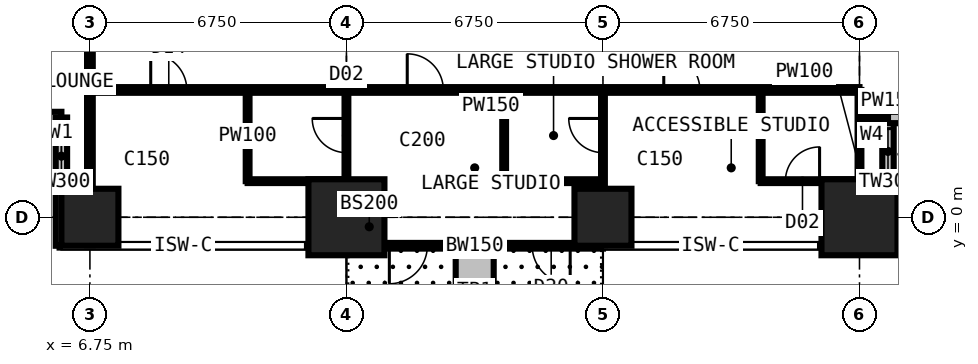
"""IFC4 building model, lengths in metres.
Left out: names, types, materials, properties, quantities, classifications, styles, units other than length and angle.
Written with IfcOpenShell. Run it as: python <this file> out.ifc"""

import sys

from ifc_helpers import new_model, si_unit, direction, frame, frame_2d, origin, origin_2d, place, context, subcontext, project, spatial, rectangle, extrude, element, fill, save


model = new_model("IFC4")
c1 = context("Model", 3, precision=1e-05, world=origin(), true_north=direction((0.0, 1.0)))
c2 = subcontext(c1, "Body", "Model", "MODEL_VIEW")
j1 = project(units=[si_unit("LENGTHUNIT", "METRE"), si_unit("PLANEANGLEUNIT", "RADIAN")], contexts=[c1])
p1 = place(None, origin())
s1 = spatial("IfcSite", under=j1, at=p1, CompositionType="ELEMENT")
p2 = place(p1, origin())
s2 = spatial("IfcBuilding", under=s1, at=p2, CompositionType="ELEMENT")
p3 = place(p2, frame((0.0, 0.0, 142.2)))
s3 = spatial("IfcBuildingStorey", under=s2, at=p3, CompositionType="ELEMENT", Elevation=142.2)
p4 = place(p3, frame((6.75, 0.0, 0.0), z_axis=(0.0, 0.0, 1.0), x_axis=(1.0, 0.0, 0.0)))
e1 = element("IfcColumn", 1, at=p4, inside=s3, PredefinedType="COLUMN", context=c2, shape_type="SweptSolid", body=[
    extrude(rectangle(XDim=1.5, YDim=1.5, at=origin_2d()), origin(), (0.0, 0.0, 1.0), 3.6),
])
p5 = place(p3, frame((13.5, 0.0, 0.0), z_axis=(0.0, 0.0, 1.0), x_axis=(1.0, 0.0, 0.0)))
e2 = element("IfcColumn", 2, at=p5, inside=s3, PredefinedType="COLUMN", context=c2, shape_type="SweptSolid", body=[
    extrude(rectangle(XDim=2.0, YDim=2.0, at=origin_2d()), origin(), (0.0, 0.0, 1.0), 3.6),
])
p6 = place(p3, frame((20.25, 0.0, 0.0), z_axis=(0.0, 0.0, 1.0), x_axis=(1.0, 0.0, 0.0)))
e3 = element("IfcColumn", 3, at=p6, inside=s3, PredefinedType="COLUMN", context=c2, shape_type="SweptSolid", body=[
    extrude(rectangle(XDim=1.5, YDim=1.5, at=origin_2d()), origin(), (0.0, 0.0, 1.0), 3.6),
])
p7 = place(p3, frame((27.0, 0.0, 0.0), z_axis=(0.0, 0.0, 1.0), x_axis=(1.0, 0.0, 0.0)))
e4 = element("IfcColumn", 4, at=p7, inside=s3, PredefinedType="COLUMN", context=c2, shape_type="SweptSolid", body=[
    extrude(rectangle(XDim=2.0, YDim=2.0, at=origin_2d()), origin(), (0.0, 0.0, 1.0), 3.6),
])
p8 = place(p3, frame((2.625, 2.625, 0.0), z_axis=(0.0, 0.0, 1.0), x_axis=(1.0, 0.0, 0.0)))
e5 = element("IfcWall", 5, at=p8, inside=s3, PredefinedType="SOLIDWALL", context=c2, shape_type="SweptSolid", body=[
    extrude(rectangle(XDim=3.375, YDim=0.3, at=frame_2d((1.688, 0.0))), origin(), (0.0, 0.0, 1.0), 3.375),
])
p9 = place(p8, frame((0.788, 0.0, 0.6)))
e6 = element("IfcOpeningElement", 6, at=p9, cuts=e5, PredefinedType="OPENING", context=c2, shape_type="SweptSolid", body=[
    extrude(rectangle(XDim=1.8, YDim=2.1, at=frame_2d((0.9, 1.05))), frame((0.0, 0.16, 0.0), z_axis=(0.0, -1.0, 0.0), x_axis=(1.0, 0.0, 0.0)), (0.0, 0.0, 1.0), 0.32),
])
p10 = place(p3, frame((6.0, 2.625, 0.0), z_axis=(0.0, 0.0, 1.0), x_axis=(0.0, -1.0, 0.0)))
e7 = element("IfcWall", 7, at=p10, inside=s3, PredefinedType="SOLIDWALL", context=c2, shape_type="SweptSolid", body=[
    extrude(rectangle(XDim=3.375, YDim=0.3, at=frame_2d((1.688, 0.0))), origin(), (0.0, 0.0, 1.0), 3.375),
])
p11 = place(p10, frame((0.268, 0.0, 0.9)))
e8 = element("IfcOpeningElement", 8, at=p11, cuts=e7, PredefinedType="OPENING", context=c2, shape_type="SweptSolid", body=[
    extrude(rectangle(XDim=1.5, YDim=1.8, at=frame_2d((0.75, 0.9))), frame((0.0, 0.16, 0.0), z_axis=(0.0, -1.0, 0.0), x_axis=(1.0, 0.0, 0.0)), (0.0, 0.0, 1.0), 0.32),
])
p12 = place(p3, frame((20.25, -0.75, 0.0), z_axis=(0.0, 0.0, 1.0), x_axis=(-1.0, 0.0, 0.0)))
e9 = element("IfcWall", 9, at=p12, inside=s3, PredefinedType="SOLIDWALL", context=c2, shape_type="SweptSolid", body=[
    extrude(rectangle(XDim=6.75, YDim=0.15, at=frame_2d((3.375, 0.0))), origin(), (0.0, 0.0, 1.0), 3.375),
])
p13 = place(p12, frame((0.863, 0.0, 0.0)))
e10 = element("IfcOpeningElement", 10, at=p13, cuts=e9, PredefinedType="OPENING", context=c2, shape_type="SweptSolid", body=[
    extrude(rectangle(XDim=1.0, YDim=2.2, at=frame_2d((0.5, 1.1))), frame((0.0, 0.085, 0.0), z_axis=(0.0, -1.0, 0.0), x_axis=(1.0, 0.0, 0.0)), (0.0, 0.0, 1.0), 0.17),
])
p14 = place(p12, frame((1.975, 0.0, 0.9)))
e11 = element("IfcOpeningElement", 11, at=p14, cuts=e9, PredefinedType="OPENING", context=c2, shape_type="SweptSolid", body=[
    extrude(rectangle(XDim=1.2, YDim=1.8, at=frame_2d((0.6, 0.9))), frame((0.0, 0.085, 0.0), z_axis=(0.0, -1.0, 0.0), x_axis=(1.0, 0.0, 0.0)), (0.0, 0.0, 1.0), 0.17),
])
p15 = place(p12, frame((4.621, 0.0, 0.0)))
e12 = element("IfcOpeningElement", 12, at=p15, cuts=e9, PredefinedType="OPENING", context=c2, shape_type="SweptSolid", body=[
    extrude(rectangle(XDim=1.0, YDim=2.2, at=frame_2d((0.5, 1.1))), frame((0.0, 0.085, 0.0), z_axis=(0.0, -1.0, 0.0), x_axis=(1.0, 0.0, 0.0)), (0.0, 0.0, 1.0), 0.17),
])
p16 = place(p12, frame((3.592, 0.0, 0.9)))
e13 = element("IfcOpeningElement", 13, at=p16, cuts=e9, PredefinedType="OPENING", context=c2, shape_type="SweptSolid", body=[
    extrude(rectangle(XDim=0.9, YDim=1.8, at=frame_2d((0.45, 0.9))), frame((0.0, 0.085, 0.0), z_axis=(0.0, -1.0, 0.0), x_axis=(1.0, 0.0, 0.0)), (0.0, 0.0, 1.0), 0.17),
])
p17 = place(p3, frame((27.75, -0.75, 0.0), z_axis=(0.0, 0.0, 1.0), x_axis=(0.0, 1.0, 0.0)))
e14 = element("IfcWall", 14, at=p17, inside=s3, PredefinedType="SOLIDWALL", context=c2, shape_type="SweptSolid", body=[
    extrude(rectangle(XDim=3.375, YDim=0.3, at=frame_2d((1.688, 0.0))), origin(), (0.0, 0.0, 1.0), 3.375),
])
p18 = place(p17, frame((1.883, 0.0, 0.9)))
e15 = element("IfcOpeningElement", 15, at=p18, cuts=e14, PredefinedType="OPENING", context=c2, shape_type="SweptSolid", body=[
    extrude(rectangle(XDim=1.2, YDim=1.8, at=frame_2d((0.6, 0.9))), frame((0.0, 0.16, 0.0), z_axis=(0.0, -1.0, 0.0), x_axis=(1.0, 0.0, 0.0)), (0.0, 0.0, 1.0), 0.32),
])
p19 = place(p3, frame((27.75, 2.625, 0.0), z_axis=(0.0, 0.0, 1.0), x_axis=(1.0, 0.0, 0.0)))
e16 = element("IfcWall", 16, at=p19, inside=s3, PredefinedType="SOLIDWALL", context=c2, shape_type="SweptSolid", body=[
    extrude(rectangle(XDim=3.375, YDim=0.3, at=frame_2d((1.688, 0.0))), origin(), (0.0, 0.0, 1.0), 3.375),
])
p20 = place(p19, frame((0.788, 0.0, 0.6)))
e17 = element("IfcOpeningElement", 17, at=p20, cuts=e16, PredefinedType="OPENING", context=c2, shape_type="SweptSolid", body=[
    extrude(rectangle(XDim=1.8, YDim=2.1, at=frame_2d((0.9, 1.05))), frame((0.0, 0.16, 0.0), z_axis=(0.0, -1.0, 0.0), x_axis=(1.0, 0.0, 0.0)), (0.0, 0.0, 1.0), 0.32),
])
p21 = place(p3, frame((16.875, -0.85, 0.0), z_axis=(0.0, 0.0, 1.0), x_axis=(0.0, -1.0, 0.0)))
e18 = element("IfcWall", 18, at=p21, inside=s3, PredefinedType="USERDEFINED", context=c2, shape_type="SweptSolid", body=[
    extrude(rectangle(XDim=2.2, YDim=1.0, at=frame_2d((1.1, 0.0))), origin(), (0.0, 0.0, 1.0), 0.9),
])
p22 = place(p3, frame((6.75, -0.734, 0.0), z_axis=(0.0, 0.0, 1.0), x_axis=(0.0, 1.0, 0.0)))
e19 = element("IfcWall", 19, at=p22, inside=s3, PredefinedType="PARTITIONING", context=c2, shape_type="SweptSolid", body=[
    extrude(rectangle(XDim=10.859, YDim=0.15, at=frame_2d((5.429, 0.0))), origin(), (0.0, 0.0, 1.0), 2.877),
])
p23 = place(p22, frame((5.684, 0.0, 0.0)))
e20 = element("IfcOpeningElement", 20, at=p23, cuts=e19, PredefinedType="OPENING", context=c2, shape_type="SweptSolid", body=[
    extrude(rectangle(XDim=1.0, YDim=2.2, at=frame_2d((0.5, 1.1))), frame((0.0, 0.085, 0.0), z_axis=(0.0, -1.0, 0.0), x_axis=(1.0, 0.0, 0.0)), (0.0, 0.0, 1.0), 0.17),
])
p24 = place(p3, frame((6.75, 3.35, 0.0), z_axis=(0.0, 0.0, 1.0), x_axis=(1.0, 0.0, 0.0)))
e21 = element("IfcWall", 21, at=p24, inside=s3, PredefinedType="PARTITIONING", context=c2, shape_type="SweptSolid", body=[
    extrude(rectangle(XDim=20.25, YDim=0.15, at=frame_2d((10.125, 0.0))), origin(), (0.0, 0.0, 1.0), 3.375),
])
p25 = place(p24, frame((15.1, 0.0, 0.0)))
e22 = element("IfcOpeningElement", 22, at=p25, cuts=e21, PredefinedType="OPENING", context=c2, shape_type="SweptSolid", body=[
    extrude(rectangle(XDim=0.95, YDim=2.2, at=frame_2d((0.475, 1.1))), frame((0.0, 0.085, 0.0), z_axis=(0.0, -1.0, 0.0), x_axis=(1.0, 0.0, 0.0)), (0.0, 0.0, 1.0), 0.17),
])
p26 = place(p24, frame((8.35, 0.0, 0.0)))
e23 = element("IfcOpeningElement", 23, at=p26, cuts=e21, PredefinedType="OPENING", context=c2, shape_type="SweptSolid", body=[
    extrude(rectangle(XDim=0.95, YDim=2.2, at=frame_2d((0.475, 1.1))), frame((0.0, 0.085, 0.0), z_axis=(0.0, -1.0, 0.0), x_axis=(1.0, 0.0, 0.0)), (0.0, 0.0, 1.0), 0.17),
])
p27 = place(p24, frame((1.6, 0.0, 0.0)))
e24 = element("IfcOpeningElement", 24, at=p27, cuts=e21, PredefinedType="OPENING", context=c2, shape_type="SweptSolid", body=[
    extrude(rectangle(XDim=0.95, YDim=2.2, at=frame_2d((0.475, 1.1))), frame((0.0, 0.085, 0.0), z_axis=(0.0, -1.0, 0.0), x_axis=(1.0, 0.0, 0.0)), (0.0, 0.0, 1.0), 0.17),
])
p28 = place(p3, frame((10.9, 0.95, 0.0), z_axis=(0.0, 0.0, 1.0), x_axis=(0.0, 1.0, 0.0)))
e25 = element("IfcWall", 25, at=p28, inside=s3, PredefinedType="PARTITIONING", context=c2, shape_type="SweptSolid", body=[
    extrude(rectangle(XDim=2.4, YDim=0.1, at=frame_2d((1.2, 0.0))), origin(), (0.0, 0.0, 1.0), 3.375),
])
p29 = place(p3, frame((10.9, 0.95, 0.0), z_axis=(0.0, 0.0, 1.0), x_axis=(1.0, 0.0, 0.0)))
e26 = element("IfcWall", 26, at=p29, inside=s3, PredefinedType="PARTITIONING", context=c2, shape_type="SweptSolid", body=[
    extrude(rectangle(XDim=2.6, YDim=0.1, at=frame_2d((1.3, 0.0))), origin(), (0.0, 0.0, 1.0), 3.375),
])
p30 = place(p3, frame((13.5, -0.734, 0.0), z_axis=(0.0, 0.0, 1.0), x_axis=(0.0, 1.0, 0.0)))
e27 = element("IfcWall", 27, at=p30, inside=s3, PredefinedType="PARTITIONING", context=c2, shape_type="SweptSolid", body=[
    extrude(rectangle(XDim=4.084, YDim=0.1, at=frame_2d((2.042, 0.0))), origin(), (0.0, 0.0, 1.0), 2.877),
])
p31 = place(p30, frame((2.434, 0.0, 0.0)))
e28 = element("IfcOpeningElement", 28, at=p31, cuts=e27, PredefinedType="OPENING", context=c2, shape_type="SweptSolid", body=[
    extrude(rectangle(XDim=0.9, YDim=2.2, at=frame_2d((0.45, 1.1))), frame((0.0, 0.06, 0.0), z_axis=(0.0, -1.0, 0.0), x_axis=(1.0, 0.0, 0.0)), (0.0, 0.0, 1.0), 0.12),
])
p32 = place(p3, frame((17.65, 0.95, 0.0), z_axis=(0.0, 0.0, 1.0), x_axis=(0.0, 1.0, 0.0)))
e29 = element("IfcWall", 29, at=p32, inside=s3, PredefinedType="PARTITIONING", context=c2, shape_type="SweptSolid", body=[
    extrude(rectangle(XDim=2.4, YDim=0.1, at=frame_2d((1.2, 0.0))), origin(), (0.0, 0.0, 1.0), 3.375),
])
p33 = place(p3, frame((17.65, 0.95, 0.0), z_axis=(0.0, 0.0, 1.0), x_axis=(1.0, 0.0, 0.0)))
e30 = element("IfcWall", 30, at=p33, inside=s3, PredefinedType="PARTITIONING", context=c2, shape_type="SweptSolid", body=[
    extrude(rectangle(XDim=2.6, YDim=0.1, at=frame_2d((1.3, 0.0))), origin(), (0.0, 0.0, 1.0), 3.375),
])
p34 = place(p3, frame((20.25, -0.734, 0.0), z_axis=(0.0, 0.0, 1.0), x_axis=(0.0, 1.0, 0.0)))
e31 = element("IfcWall", 31, at=p34, inside=s3, PredefinedType="PARTITIONING", context=c2, shape_type="SweptSolid", body=[
    extrude(rectangle(XDim=4.084, YDim=0.1, at=frame_2d((2.042, 0.0))), origin(), (0.0, 0.0, 1.0), 2.877),
])
p35 = place(p34, frame((2.434, 0.0, 0.0)))
e32 = element("IfcOpeningElement", 32, at=p35, cuts=e31, PredefinedType="OPENING", context=c2, shape_type="SweptSolid", body=[
    extrude(rectangle(XDim=0.9, YDim=2.2, at=frame_2d((0.45, 1.1))), frame((0.0, 0.06, 0.0), z_axis=(0.0, -1.0, 0.0), x_axis=(1.0, 0.0, 0.0)), (0.0, 0.0, 1.0), 0.12),
])
p36 = place(p3, frame((24.4, 0.95, 0.0), z_axis=(0.0, 0.0, 1.0), x_axis=(0.0, 1.0, 0.0)))
e33 = element("IfcWall", 33, at=p36, inside=s3, PredefinedType="PARTITIONING", context=c2, shape_type="SweptSolid", body=[
    extrude(rectangle(XDim=2.4, YDim=0.1, at=frame_2d((1.2, 0.0))), origin(), (0.0, 0.0, 1.0), 3.375),
])
p37 = place(p3, frame((24.4, 0.95, 0.0), z_axis=(0.0, 0.0, 1.0), x_axis=(1.0, 0.0, 0.0)))
e34 = element("IfcWall", 34, at=p37, inside=s3, PredefinedType="PARTITIONING", context=c2, shape_type="SweptSolid", body=[
    extrude(rectangle(XDim=2.6, YDim=0.1, at=frame_2d((1.3, 0.0))), origin(), (0.0, 0.0, 1.0), 3.375),
])
p38 = place(p37, frame((0.65, 0.0, 0.0)))
e35 = element("IfcOpeningElement", 35, at=p38, cuts=e34, PredefinedType="OPENING", context=c2, shape_type="SweptSolid", body=[
    extrude(rectangle(XDim=0.9, YDim=2.2, at=frame_2d((0.45, 1.1))), frame((0.0, 0.06, 0.0), z_axis=(0.0, -1.0, 0.0), x_axis=(1.0, 0.0, 0.0)), (0.0, 0.0, 1.0), 0.12),
])
p39 = place(p3, frame((27.0, -0.734, 0.0), z_axis=(0.0, 0.0, 1.0), x_axis=(0.0, 1.0, 0.0)))
e36 = element("IfcWall", 36, at=p39, inside=s3, PredefinedType="PARTITIONING", context=c2, shape_type="SweptSolid", body=[
    extrude(rectangle(XDim=4.084, YDim=0.1, at=frame_2d((2.042, 0.0))), origin(), (0.0, 0.0, 1.0), 2.877),
])
p40 = place(p3, frame((27.0, 2.625, 0.0), z_axis=(0.0, 0.0, 1.0), x_axis=(1.0, 0.0, 0.0)))
e37 = element("IfcWall", 37, at=p40, inside=s3, PredefinedType="PARTITIONING", context=c2, shape_type="SweptSolid", body=[
    extrude(rectangle(XDim=0.734, YDim=0.15, at=frame_2d((0.367, 0.0))), origin(), (0.0, 0.0, 1.0), 3.375),
])
p41 = place(p11, origin())
e38 = element("IfcWindow", 38, at=p41, inside=s3, PartitioningType="SINGLE_PANEL", PredefinedType="WINDOW", context=c2, shape_type="SweptSolid", body=[
    extrude(rectangle(XDim=1.5, YDim=1.8, at=frame_2d((0.75, 0.9))), frame((0.0, 0.03, 0.0), z_axis=(0.0, -1.0, 0.0), x_axis=(1.0, 0.0, 0.0)), (0.0, 0.0, 1.0), 0.06),
])
fill(e8, e38)
p42 = place(p13, origin())
e39 = element("IfcDoor", 39, at=p42, inside=s3, OperationType="SINGLE_SWING_LEFT", PredefinedType="DOOR", context=c2, shape_type="SweptSolid", body=[
    extrude(rectangle(XDim=1.0, YDim=2.2, at=frame_2d((0.5, 1.1))), frame((0.0, 0.025, 0.0), z_axis=(0.0, -1.0, 0.0), x_axis=(1.0, 0.0, 0.0)), (0.0, 0.0, 1.0), 0.05),
])
fill(e10, e39)
p43 = place(p14, origin())
e40 = element("IfcWindow", 40, at=p43, inside=s3, PartitioningType="SINGLE_PANEL", PredefinedType="WINDOW", context=c2, shape_type="SweptSolid", body=[
    extrude(rectangle(XDim=1.2, YDim=1.8, at=frame_2d((0.6, 0.9))), frame((0.0, 0.03, 0.0), z_axis=(0.0, -1.0, 0.0), x_axis=(1.0, 0.0, 0.0)), (0.0, 0.0, 1.0), 0.06),
])
fill(e11, e40)
p44 = place(p15, origin())
e41 = element("IfcDoor", 41, at=p44, inside=s3, OperationType="SINGLE_SWING_RIGHT", PredefinedType="DOOR", context=c2, shape_type="SweptSolid", body=[
    extrude(rectangle(XDim=1.0, YDim=2.2, at=frame_2d((0.5, 1.1))), frame((0.0, 0.025, 0.0), z_axis=(0.0, -1.0, 0.0), x_axis=(1.0, 0.0, 0.0)), (0.0, 0.0, 1.0), 0.05),
])
fill(e12, e41)
p45 = place(p16, origin())
e42 = element("IfcWindow", 42, at=p45, inside=s3, PartitioningType="SINGLE_PANEL", PredefinedType="WINDOW", context=c2, shape_type="SweptSolid", body=[
    extrude(rectangle(XDim=0.9, YDim=1.8, at=frame_2d((0.45, 0.9))), frame((0.0, 0.03, 0.0), z_axis=(0.0, -1.0, 0.0), x_axis=(1.0, 0.0, 0.0)), (0.0, 0.0, 1.0), 0.06),
])
fill(e13, e42)
p46 = place(p18, origin())
e43 = element("IfcWindow", 43, at=p46, inside=s3, PartitioningType="SINGLE_PANEL", PredefinedType="WINDOW", context=c2, shape_type="SweptSolid", body=[
    extrude(rectangle(XDim=1.2, YDim=1.8, at=frame_2d((0.6, 0.9))), frame((0.0, 0.03, 0.0), z_axis=(0.0, -1.0, 0.0), x_axis=(1.0, 0.0, 0.0)), (0.0, 0.0, 1.0), 0.06),
])
fill(e15, e43)
p47 = place(p25, origin())
e44 = element("IfcDoor", 44, at=p47, inside=s3, OperationType="SINGLE_SWING_LEFT", PredefinedType="DOOR", context=c2, shape_type="SweptSolid", body=[
    extrude(rectangle(XDim=0.95, YDim=2.2, at=frame_2d((0.475, 1.1))), frame((0.0, 0.025, 0.0), z_axis=(0.0, -1.0, 0.0), x_axis=(1.0, 0.0, 0.0)), (0.0, 0.0, 1.0), 0.05),
])
fill(e22, e44)
p48 = place(p38, origin())
e45 = element("IfcDoor", 45, at=p48, inside=s3, OperationType="SINGLE_SWING_RIGHT", PredefinedType="DOOR", context=c2, shape_type="SweptSolid", body=[
    extrude(rectangle(XDim=0.9, YDim=2.2, at=frame_2d((0.45, 1.1))), frame((0.0, 0.025, 0.0), z_axis=(0.0, -1.0, 0.0), x_axis=(1.0, 0.0, 0.0)), (0.0, 0.0, 1.0), 0.05),
])
fill(e35, e45)
p49 = place(p26, origin())
e46 = element("IfcDoor", 46, at=p49, inside=s3, OperationType="SINGLE_SWING_LEFT", PredefinedType="DOOR", context=c2, shape_type="SweptSolid", body=[
    extrude(rectangle(XDim=0.95, YDim=2.2, at=frame_2d((0.475, 1.1))), frame((0.0, 0.025, 0.0), z_axis=(0.0, -1.0, 0.0), x_axis=(1.0, 0.0, 0.0)), (0.0, 0.0, 1.0), 0.05),
])
fill(e23, e46)
p50 = place(p35, origin())
e47 = element("IfcDoor", 47, at=p50, inside=s3, OperationType="SINGLE_SWING_RIGHT", PredefinedType="DOOR", context=c2, shape_type="SweptSolid", body=[
    extrude(rectangle(XDim=0.9, YDim=2.2, at=frame_2d((0.45, 1.1))), frame((0.0, 0.025, 0.0), z_axis=(0.0, -1.0, 0.0), x_axis=(1.0, 0.0, 0.0)), (0.0, 0.0, 1.0), 0.05),
])
fill(e32, e47)
p51 = place(p27, origin())
e48 = element("IfcDoor", 48, at=p51, inside=s3, OperationType="SINGLE_SWING_LEFT", PredefinedType="DOOR", context=c2, shape_type="SweptSolid", body=[
    extrude(rectangle(XDim=0.95, YDim=2.2, at=frame_2d((0.475, 1.1))), frame((0.0, 0.025, 0.0), z_axis=(0.0, -1.0, 0.0), x_axis=(1.0, 0.0, 0.0)), (0.0, 0.0, 1.0), 0.05),
])
fill(e24, e48)
p52 = place(p31, origin())
e49 = element("IfcDoor", 49, at=p52, inside=s3, OperationType="SINGLE_SWING_RIGHT", PredefinedType="DOOR", context=c2, shape_type="SweptSolid", body=[
    extrude(rectangle(XDim=0.9, YDim=2.2, at=frame_2d((0.45, 1.1))), frame((0.0, 0.025, 0.0), z_axis=(0.0, -1.0, 0.0), x_axis=(1.0, 0.0, 0.0)), (0.0, 0.0, 1.0), 0.05),
])
fill(e28, e49)
save(model, sys.argv[1])
